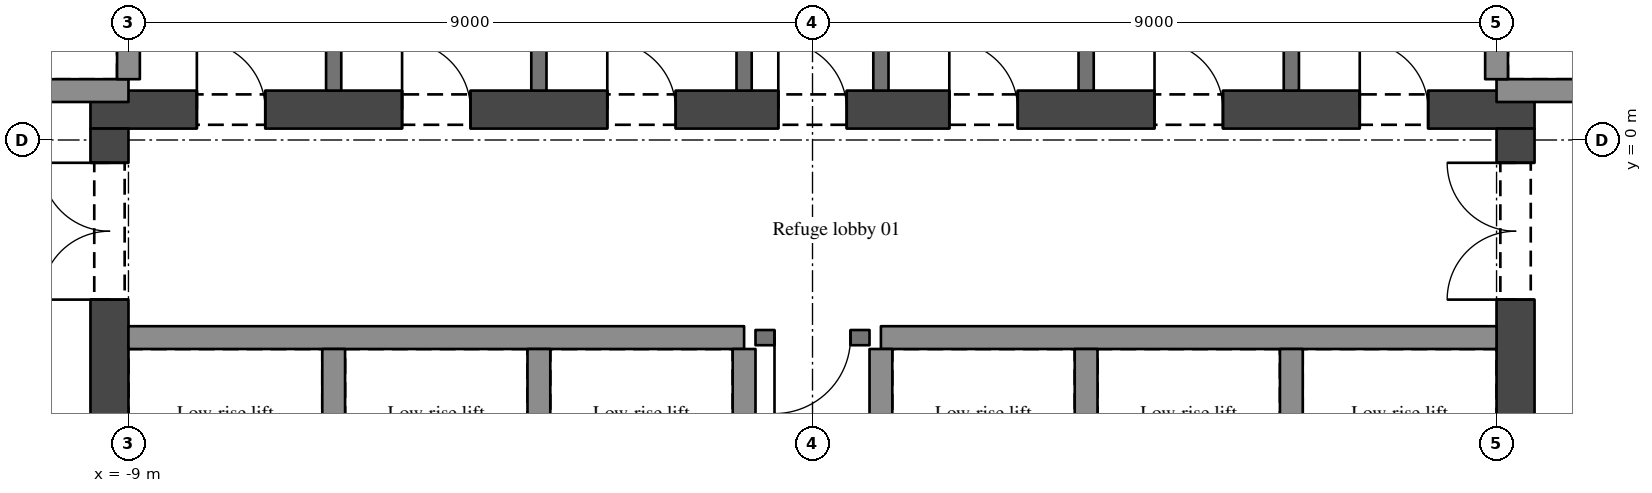
"""IFC4 building model, lengths in metres.
Left out: names, types, materials, properties, quantities, classifications, styles, units other than length and angle.
Written with IfcOpenShell. Run it as: python <this file> out.ifc"""

import sys

from ifc_helpers import new_model, si_unit, direction, frame, frame_2d, origin, place, context, subcontext, project, spatial, rectangle, extrude, element, fill, save


model = new_model("IFC4")
c1 = context("Model", 3, precision=1e-05, world=origin(), true_north=direction((0.0, 1.0)))
c2 = subcontext(c1, "Body", "Model", "MODEL_VIEW")
j1 = project(units=[si_unit("LENGTHUNIT", "METRE"), si_unit("PLANEANGLEUNIT", "RADIAN")], contexts=[c1])
p1 = place(None, origin())
s1 = spatial("IfcSite", under=j1, at=p1, CompositionType="ELEMENT")
p2 = place(p1, origin())
s2 = spatial("IfcBuilding", under=s1, at=p2, CompositionType="ELEMENT")
p3 = place(p2, frame((0.0, 0.0, 57.6)))
s3 = spatial("IfcBuildingStorey", under=s2, at=p3, CompositionType="ELEMENT", Elevation=57.6)
p4 = place(p3, frame((-9.5, 0.4, 0.0), z_axis=(0.0, 0.0, 1.0), x_axis=(1.0, 0.0, 0.0)))
e1 = element("IfcWall", 1, at=p4, inside=s3, PredefinedType="SHEAR", context=c2, shape_type="SweptSolid", body=[
    extrude(rectangle(XDim=19.0, YDim=0.5, at=frame_2d((9.5, 0.0))), origin(), (0.0, 0.0, 1.0), 4.5),
])
p5 = place(p4, frame((1.4, 0.0, 0.0)))
e2 = element("IfcOpeningElement", 2, at=p5, cuts=e1, PredefinedType="OPENING", context=c2, shape_type="SweptSolid", body=[
    extrude(rectangle(XDim=0.9, YDim=2.1, at=frame_2d((0.45, 1.05))), frame((0.0, 0.26, 0.0), z_axis=(0.0, -1.0, 0.0), x_axis=(1.0, 0.0, 0.0)), (0.0, 0.0, 1.0), 0.52),
])
p6 = place(p4, frame((4.1, 0.0, 0.0)))
e3 = element("IfcOpeningElement", 3, at=p6, cuts=e1, PredefinedType="OPENING", context=c2, shape_type="SweptSolid", body=[
    extrude(rectangle(XDim=0.9, YDim=2.1, at=frame_2d((0.45, 1.05))), frame((0.0, 0.26, 0.0), z_axis=(0.0, -1.0, 0.0), x_axis=(1.0, 0.0, 0.0)), (0.0, 0.0, 1.0), 0.52),
])
p7 = place(p4, frame((6.8, 0.0, 0.0)))
e4 = element("IfcOpeningElement", 4, at=p7, cuts=e1, PredefinedType="OPENING", context=c2, shape_type="SweptSolid", body=[
    extrude(rectangle(XDim=0.9, YDim=2.1, at=frame_2d((0.45, 1.05))), frame((0.0, 0.26, 0.0), z_axis=(0.0, -1.0, 0.0), x_axis=(1.0, 0.0, 0.0)), (0.0, 0.0, 1.0), 0.52),
])
p8 = place(p4, frame((11.3, 0.0, 0.0)))
e5 = element("IfcOpeningElement", 5, at=p8, cuts=e1, PredefinedType="OPENING", context=c2, shape_type="SweptSolid", body=[
    extrude(rectangle(XDim=0.9, YDim=2.1, at=frame_2d((0.45, 1.05))), frame((0.0, 0.26, 0.0), z_axis=(0.0, -1.0, 0.0), x_axis=(1.0, 0.0, 0.0)), (0.0, 0.0, 1.0), 0.52),
])
p9 = place(p4, frame((14.0, 0.0, 0.0)))
e6 = element("IfcOpeningElement", 6, at=p9, cuts=e1, PredefinedType="OPENING", context=c2, shape_type="SweptSolid", body=[
    extrude(rectangle(XDim=0.9, YDim=2.1, at=frame_2d((0.45, 1.05))), frame((0.0, 0.26, 0.0), z_axis=(0.0, -1.0, 0.0), x_axis=(1.0, 0.0, 0.0)), (0.0, 0.0, 1.0), 0.52),
])
p10 = place(p4, frame((16.7, 0.0, 0.0)))
e7 = element("IfcOpeningElement", 7, at=p10, cuts=e1, PredefinedType="OPENING", context=c2, shape_type="SweptSolid", body=[
    extrude(rectangle(XDim=0.9, YDim=2.1, at=frame_2d((0.45, 1.05))), frame((0.0, 0.26, 0.0), z_axis=(0.0, -1.0, 0.0), x_axis=(1.0, 0.0, 0.0)), (0.0, 0.0, 1.0), 0.52),
])
p11 = place(p4, frame((9.05, 0.0, 0.0)))
e8 = element("IfcOpeningElement", 8, at=p11, cuts=e1, PredefinedType="OPENING", context=c2, shape_type="SweptSolid", body=[
    extrude(rectangle(XDim=0.9, YDim=2.1, at=frame_2d((0.45, 1.05))), frame((0.0, 0.26, 0.0), z_axis=(0.0, -1.0, 0.0), x_axis=(1.0, 0.0, 0.0)), (0.0, 0.0, 1.0), 0.52),
])
p12 = place(p3, frame((-9.25, -11.5, 0.0), z_axis=(0.0, 0.0, 1.0), x_axis=(0.0, 1.0, 0.0)))
e9 = element("IfcWall", 9, at=p12, inside=s3, PredefinedType="SHEAR", context=c2, shape_type="SweptSolid", body=[
    extrude(rectangle(XDim=11.65, YDim=0.5, at=frame_2d((5.825, 0.0))), origin(), (0.0, 0.0, 1.0), 4.5),
])
p13 = place(p12, frame((9.4, 0.0, 0.0)))
e10 = element("IfcOpeningElement", 10, at=p13, cuts=e9, PredefinedType="OPENING", context=c2, shape_type="SweptSolid", body=[
    extrude(rectangle(XDim=1.8, YDim=2.1, at=frame_2d((0.9, 1.05))), frame((0.0, 0.26, 0.0), z_axis=(0.0, -1.0, 0.0), x_axis=(1.0, 0.0, 0.0)), (0.0, 0.0, 1.0), 0.52),
])
p14 = place(p12, frame((5.25, 0.0, 0.0)))
e11 = element("IfcOpeningElement", 11, at=p14, cuts=e9, PredefinedType="OPENING", context=c2, shape_type="SweptSolid", body=[
    extrude(rectangle(XDim=1.1, YDim=2.1, at=frame_2d((0.55, 1.05))), frame((0.0, 0.26, 0.0), z_axis=(0.0, -1.0, 0.0), x_axis=(1.0, 0.0, 0.0)), (0.0, 0.0, 1.0), 0.52),
])
p15 = place(p3, frame((9.25, -11.5, 0.0), z_axis=(0.0, 0.0, 1.0), x_axis=(0.0, 1.0, 0.0)))
e12 = element("IfcWall", 12, at=p15, inside=s3, PredefinedType="SHEAR", context=c2, shape_type="SweptSolid", body=[
    extrude(rectangle(XDim=11.65, YDim=0.5, at=frame_2d((5.825, 0.0))), origin(), (0.0, 0.0, 1.0), 4.5),
])
p16 = place(p15, frame((9.4, 0.0, 0.0)))
e13 = element("IfcOpeningElement", 13, at=p16, cuts=e12, PredefinedType="OPENING", context=c2, shape_type="SweptSolid", body=[
    extrude(rectangle(XDim=1.8, YDim=2.1, at=frame_2d((0.9, 1.05))), frame((0.0, 0.26, 0.0), z_axis=(0.0, -1.0, 0.0), x_axis=(1.0, 0.0, 0.0)), (0.0, 0.0, 1.0), 0.52),
])
p17 = place(p15, frame((5.25, 0.0, 0.0)))
e14 = element("IfcOpeningElement", 14, at=p17, cuts=e12, PredefinedType="OPENING", context=c2, shape_type="SweptSolid", body=[
    extrude(rectangle(XDim=1.1, YDim=2.1, at=frame_2d((0.55, 1.05))), frame((0.0, 0.26, 0.0), z_axis=(0.0, -1.0, 0.0), x_axis=(1.0, 0.0, 0.0)), (0.0, 0.0, 1.0), 0.52),
])
p18 = place(p3, frame((-9.0, -2.6, 0.0), z_axis=(0.0, 0.0, 1.0), x_axis=(1.0, 0.0, 0.0)))
e15 = element("IfcWall", 15, at=p18, inside=s3, PredefinedType="SHEAR", context=c2, shape_type="SweptSolid", body=[
    extrude(rectangle(XDim=8.1, YDim=0.3, at=frame_2d((4.05, 0.0))), origin(), (0.0, 0.0, 1.0), 4.5),
])
p19 = place(p3, frame((0.75, -2.6, 0.0), z_axis=(0.0, 0.0, 1.0), x_axis=(-1.0, 0.0, 0.0)))
e16 = element("IfcWall", 16, at=p19, inside=s3, PredefinedType="SOLIDWALL", context=c2, shape_type="SweptSolid", body=[
    extrude(rectangle(XDim=1.5, YDim=0.2, at=frame_2d((0.75, 0.0))), origin(), (0.0, 0.0, 1.0), 4.2),
])
p20 = place(p19, frame((0.25, 0.0, 0.0)))
e17 = element("IfcOpeningElement", 17, at=p20, cuts=e16, PredefinedType="OPENING", context=c2, shape_type="SweptSolid", body=[
    extrude(rectangle(XDim=1.0, YDim=2.1, at=frame_2d((0.5, 1.05))), frame((0.0, 0.11, 0.0), z_axis=(0.0, -1.0, 0.0), x_axis=(1.0, 0.0, 0.0)), (0.0, 0.0, 1.0), 0.22),
])
p21 = place(p3, frame((0.9, -2.6, 0.0), z_axis=(0.0, 0.0, 1.0), x_axis=(1.0, 0.0, 0.0)))
e18 = element("IfcWall", 18, at=p21, inside=s3, PredefinedType="SHEAR", context=c2, shape_type="SweptSolid", body=[
    extrude(rectangle(XDim=8.1, YDim=0.3, at=frame_2d((4.05, 0.0))), origin(), (0.0, 0.0, 1.0), 4.5),
])
for number, where, z_axis, x_axis in (
    (19, (-9.0, 0.65, 0.0), (0.0, 0.0, 1.0), (-1.0, 0.0, 0.0)),
    (20, (12.25, 0.65, 0.0), (0.0, 0.0, 1.0), (-1.0, 0.0, 0.0)),
):
    element("IfcWall", number, at=place(p3, frame(where, z_axis=z_axis, x_axis=x_axis)), inside=s3, PredefinedType="SHEAR", context=c2, shape_type="SweptSolid", body=[
        extrude(rectangle(XDim=3.25, YDim=0.3, at=frame_2d((1.625, 0.0))), origin(), (0.0, 0.0, 1.0), 4.5),
    ])
p22 = place(p3, frame((-9.0, 0.8, 0.0), z_axis=(0.0, 0.0, 1.0), x_axis=(0.0, 1.0, 0.0)))
e21 = element("IfcWall", 21, at=p22, inside=s3, PredefinedType="SHEAR", context=c2, shape_type="SweptSolid", body=[
    extrude(rectangle(XDim=2.35, YDim=0.3, at=frame_2d((1.175, 0.0))), origin(), (0.0, 0.0, 1.0), 4.5),
])
p23 = place(p3, frame((-6.3, -4.8, 0.0), z_axis=(0.0, 0.0, 1.0), x_axis=(0.0, 1.0, 0.0)))
e22 = element("IfcWall", 22, at=p23, inside=s3, PredefinedType="SHEAR", context=c2, shape_type="SweptSolid", body=[
    extrude(rectangle(XDim=2.05, YDim=0.3, at=frame_2d((1.025, 0.0))), origin(), (0.0, 0.0, 1.0), 4.5),
])
p24 = place(p3, frame((-6.3, 0.65, 0.0), z_axis=(0.0, 0.0, 1.0), x_axis=(0.0, 1.0, 0.0)))
e23 = element("IfcWall", 23, at=p24, inside=s3, PredefinedType="SOLIDWALL", context=c2, shape_type="SweptSolid", body=[
    extrude(rectangle(XDim=2.5, YDim=0.2, at=frame_2d((1.25, 0.0))), origin(), (0.0, 0.0, 1.0), 4.2),
])
p25 = place(p3, frame((-3.6, -4.8, 0.0), z_axis=(0.0, 0.0, 1.0), x_axis=(0.0, 1.0, 0.0)))
e24 = element("IfcWall", 24, at=p25, inside=s3, PredefinedType="SHEAR", context=c2, shape_type="SweptSolid", body=[
    extrude(rectangle(XDim=2.05, YDim=0.3, at=frame_2d((1.025, 0.0))), origin(), (0.0, 0.0, 1.0), 4.5),
])
p26 = place(p3, frame((-3.6, 0.65, 0.0), z_axis=(0.0, 0.0, 1.0), x_axis=(0.0, 1.0, 0.0)))
e25 = element("IfcWall", 25, at=p26, inside=s3, PredefinedType="SOLIDWALL", context=c2, shape_type="SweptSolid", body=[
    extrude(rectangle(XDim=2.5, YDim=0.2, at=frame_2d((1.25, 0.0))), origin(), (0.0, 0.0, 1.0), 4.2),
])
p27 = place(p3, frame((-0.9, -4.8, 0.0), z_axis=(0.0, 0.0, 1.0), x_axis=(0.0, 1.0, 0.0)))
e26 = element("IfcWall", 26, at=p27, inside=s3, PredefinedType="SHEAR", context=c2, shape_type="SweptSolid", body=[
    extrude(rectangle(XDim=2.05, YDim=0.3, at=frame_2d((1.025, 0.0))), origin(), (0.0, 0.0, 1.0), 4.5),
])
p28 = place(p3, frame((-0.9, 0.65, 0.0), z_axis=(0.0, 0.0, 1.0), x_axis=(0.0, 1.0, 0.0)))
e27 = element("IfcWall", 27, at=p28, inside=s3, PredefinedType="SOLIDWALL", context=c2, shape_type="SweptSolid", body=[
    extrude(rectangle(XDim=2.5, YDim=0.2, at=frame_2d((1.25, 0.0))), origin(), (0.0, 0.0, 1.0), 4.2),
])
p29 = place(p3, frame((0.9, -4.8, 0.0), z_axis=(0.0, 0.0, 1.0), x_axis=(0.0, 1.0, 0.0)))
e28 = element("IfcWall", 28, at=p29, inside=s3, PredefinedType="SHEAR", context=c2, shape_type="SweptSolid", body=[
    extrude(rectangle(XDim=2.05, YDim=0.3, at=frame_2d((1.025, 0.0))), origin(), (0.0, 0.0, 1.0), 4.5),
])
p30 = place(p3, frame((0.9, 0.65, 0.0), z_axis=(0.0, 0.0, 1.0), x_axis=(0.0, 1.0, 0.0)))
e29 = element("IfcWall", 29, at=p30, inside=s3, PredefinedType="SOLIDWALL", context=c2, shape_type="SweptSolid", body=[
    extrude(rectangle(XDim=2.5, YDim=0.2, at=frame_2d((1.25, 0.0))), origin(), (0.0, 0.0, 1.0), 4.2),
])
p31 = place(p3, frame((3.6, -4.8, 0.0), z_axis=(0.0, 0.0, 1.0), x_axis=(0.0, 1.0, 0.0)))
e30 = element("IfcWall", 30, at=p31, inside=s3, PredefinedType="SHEAR", context=c2, shape_type="SweptSolid", body=[
    extrude(rectangle(XDim=2.05, YDim=0.3, at=frame_2d((1.025, 0.0))), origin(), (0.0, 0.0, 1.0), 4.5),
])
p32 = place(p3, frame((3.6, 0.65, 0.0), z_axis=(0.0, 0.0, 1.0), x_axis=(0.0, 1.0, 0.0)))
e31 = element("IfcWall", 31, at=p32, inside=s3, PredefinedType="SOLIDWALL", context=c2, shape_type="SweptSolid", body=[
    extrude(rectangle(XDim=2.5, YDim=0.2, at=frame_2d((1.25, 0.0))), origin(), (0.0, 0.0, 1.0), 4.2),
])
p33 = place(p3, frame((6.3, -4.8, 0.0), z_axis=(0.0, 0.0, 1.0), x_axis=(0.0, 1.0, 0.0)))
e32 = element("IfcWall", 32, at=p33, inside=s3, PredefinedType="SHEAR", context=c2, shape_type="SweptSolid", body=[
    extrude(rectangle(XDim=2.05, YDim=0.3, at=frame_2d((1.025, 0.0))), origin(), (0.0, 0.0, 1.0), 4.5),
])
p34 = place(p3, frame((6.3, 0.65, 0.0), z_axis=(0.0, 0.0, 1.0), x_axis=(0.0, 1.0, 0.0)))
e33 = element("IfcWall", 33, at=p34, inside=s3, PredefinedType="SOLIDWALL", context=c2, shape_type="SweptSolid", body=[
    extrude(rectangle(XDim=2.5, YDim=0.2, at=frame_2d((1.25, 0.0))), origin(), (0.0, 0.0, 1.0), 4.2),
])
p35 = place(p3, frame((9.0, 0.8, 0.0), z_axis=(0.0, 0.0, 1.0), x_axis=(0.0, 1.0, 0.0)))
e34 = element("IfcWall", 34, at=p35, inside=s3, PredefinedType="SHEAR", context=c2, shape_type="SweptSolid", body=[
    extrude(rectangle(XDim=2.35, YDim=0.3, at=frame_2d((1.175, 0.0))), origin(), (0.0, 0.0, 1.0), 4.5),
])
p36 = place(p16, origin())
e35 = element("IfcDoor", 35, at=p36, inside=s3, OperationType="DOUBLE_DOOR_SINGLE_SWING", PredefinedType="DOOR", context=c2, shape_type="SweptSolid", body=[
    extrude(rectangle(XDim=1.8, YDim=2.1, at=frame_2d((0.9, 1.05))), frame((0.0, 0.025, 0.0), z_axis=(0.0, -1.0, 0.0), x_axis=(1.0, 0.0, 0.0)), (0.0, 0.0, 1.0), 0.05),
])
fill(e13, e35)
p37 = place(p13, origin())
e36 = element("IfcDoor", 36, at=p37, inside=s3, OperationType="DOUBLE_DOOR_SINGLE_SWING", PredefinedType="DOOR", context=c2, shape_type="SweptSolid", body=[
    extrude(rectangle(XDim=1.8, YDim=2.1, at=frame_2d((0.9, 1.05))), frame((0.0, 0.025, 0.0), z_axis=(0.0, -1.0, 0.0), x_axis=(1.0, 0.0, 0.0)), (0.0, 0.0, 1.0), 0.05),
])
fill(e10, e36)
p38 = place(p20, origin())
e37 = element("IfcDoor", 37, at=p38, inside=s3, OperationType="SINGLE_SWING_RIGHT", PredefinedType="DOOR", context=c2, shape_type="SweptSolid", body=[
    extrude(rectangle(XDim=1.0, YDim=2.1, at=frame_2d((0.5, 1.05))), frame((0.0, 0.025, 0.0), z_axis=(0.0, -1.0, 0.0), x_axis=(1.0, 0.0, 0.0)), (0.0, 0.0, 1.0), 0.05),
])
fill(e17, e37)
p39 = place(p5, origin())
e38 = element("IfcDoor", 38, at=p39, inside=s3, OperationType="SINGLE_SWING_LEFT", PredefinedType="DOOR", context=c2, shape_type="SweptSolid", body=[
    extrude(rectangle(XDim=0.9, YDim=2.1, at=frame_2d((0.45, 1.05))), frame((0.0, 0.025, 0.0), z_axis=(0.0, -1.0, 0.0), x_axis=(1.0, 0.0, 0.0)), (0.0, 0.0, 1.0), 0.05),
])
fill(e2, e38)
p40 = place(p6, origin())
e39 = element("IfcDoor", 39, at=p40, inside=s3, OperationType="SINGLE_SWING_LEFT", PredefinedType="DOOR", context=c2, shape_type="SweptSolid", body=[
    extrude(rectangle(XDim=0.9, YDim=2.1, at=frame_2d((0.45, 1.05))), frame((0.0, 0.025, 0.0), z_axis=(0.0, -1.0, 0.0), x_axis=(1.0, 0.0, 0.0)), (0.0, 0.0, 1.0), 0.05),
])
fill(e3, e39)
p41 = place(p7, origin())
e40 = element("IfcDoor", 40, at=p41, inside=s3, OperationType="SINGLE_SWING_LEFT", PredefinedType="DOOR", context=c2, shape_type="SweptSolid", body=[
    extrude(rectangle(XDim=0.9, YDim=2.1, at=frame_2d((0.45, 1.05))), frame((0.0, 0.025, 0.0), z_axis=(0.0, -1.0, 0.0), x_axis=(1.0, 0.0, 0.0)), (0.0, 0.0, 1.0), 0.05),
])
fill(e4, e40)
p42 = place(p8, origin())
e41 = element("IfcDoor", 41, at=p42, inside=s3, OperationType="SINGLE_SWING_LEFT", PredefinedType="DOOR", context=c2, shape_type="SweptSolid", body=[
    extrude(rectangle(XDim=0.9, YDim=2.1, at=frame_2d((0.45, 1.05))), frame((0.0, 0.025, 0.0), z_axis=(0.0, -1.0, 0.0), x_axis=(1.0, 0.0, 0.0)), (0.0, 0.0, 1.0), 0.05),
])
fill(e5, e41)
p43 = place(p9, origin())
e42 = element("IfcDoor", 42, at=p43, inside=s3, OperationType="SINGLE_SWING_LEFT", PredefinedType="DOOR", context=c2, shape_type="SweptSolid", body=[
    extrude(rectangle(XDim=0.9, YDim=2.1, at=frame_2d((0.45, 1.05))), frame((0.0, 0.025, 0.0), z_axis=(0.0, -1.0, 0.0), x_axis=(1.0, 0.0, 0.0)), (0.0, 0.0, 1.0), 0.05),
])
fill(e6, e42)
p44 = place(p10, origin())
e43 = element("IfcDoor", 43, at=p44, inside=s3, OperationType="SINGLE_SWING_LEFT", PredefinedType="DOOR", context=c2, shape_type="SweptSolid", body=[
    extrude(rectangle(XDim=0.9, YDim=2.1, at=frame_2d((0.45, 1.05))), frame((0.0, 0.025, 0.0), z_axis=(0.0, -1.0, 0.0), x_axis=(1.0, 0.0, 0.0)), (0.0, 0.0, 1.0), 0.05),
])
fill(e7, e43)
p45 = place(p11, origin())
e44 = element("IfcDoor", 44, at=p45, inside=s3, OperationType="SINGLE_SWING_LEFT", PredefinedType="DOOR", context=c2, shape_type="SweptSolid", body=[
    extrude(rectangle(XDim=0.9, YDim=2.1, at=frame_2d((0.45, 1.05))), frame((0.0, 0.025, 0.0), z_axis=(0.0, -1.0, 0.0), x_axis=(1.0, 0.0, 0.0)), (0.0, 0.0, 1.0), 0.05),
])
fill(e8, e44)
save(model, sys.argv[1])
